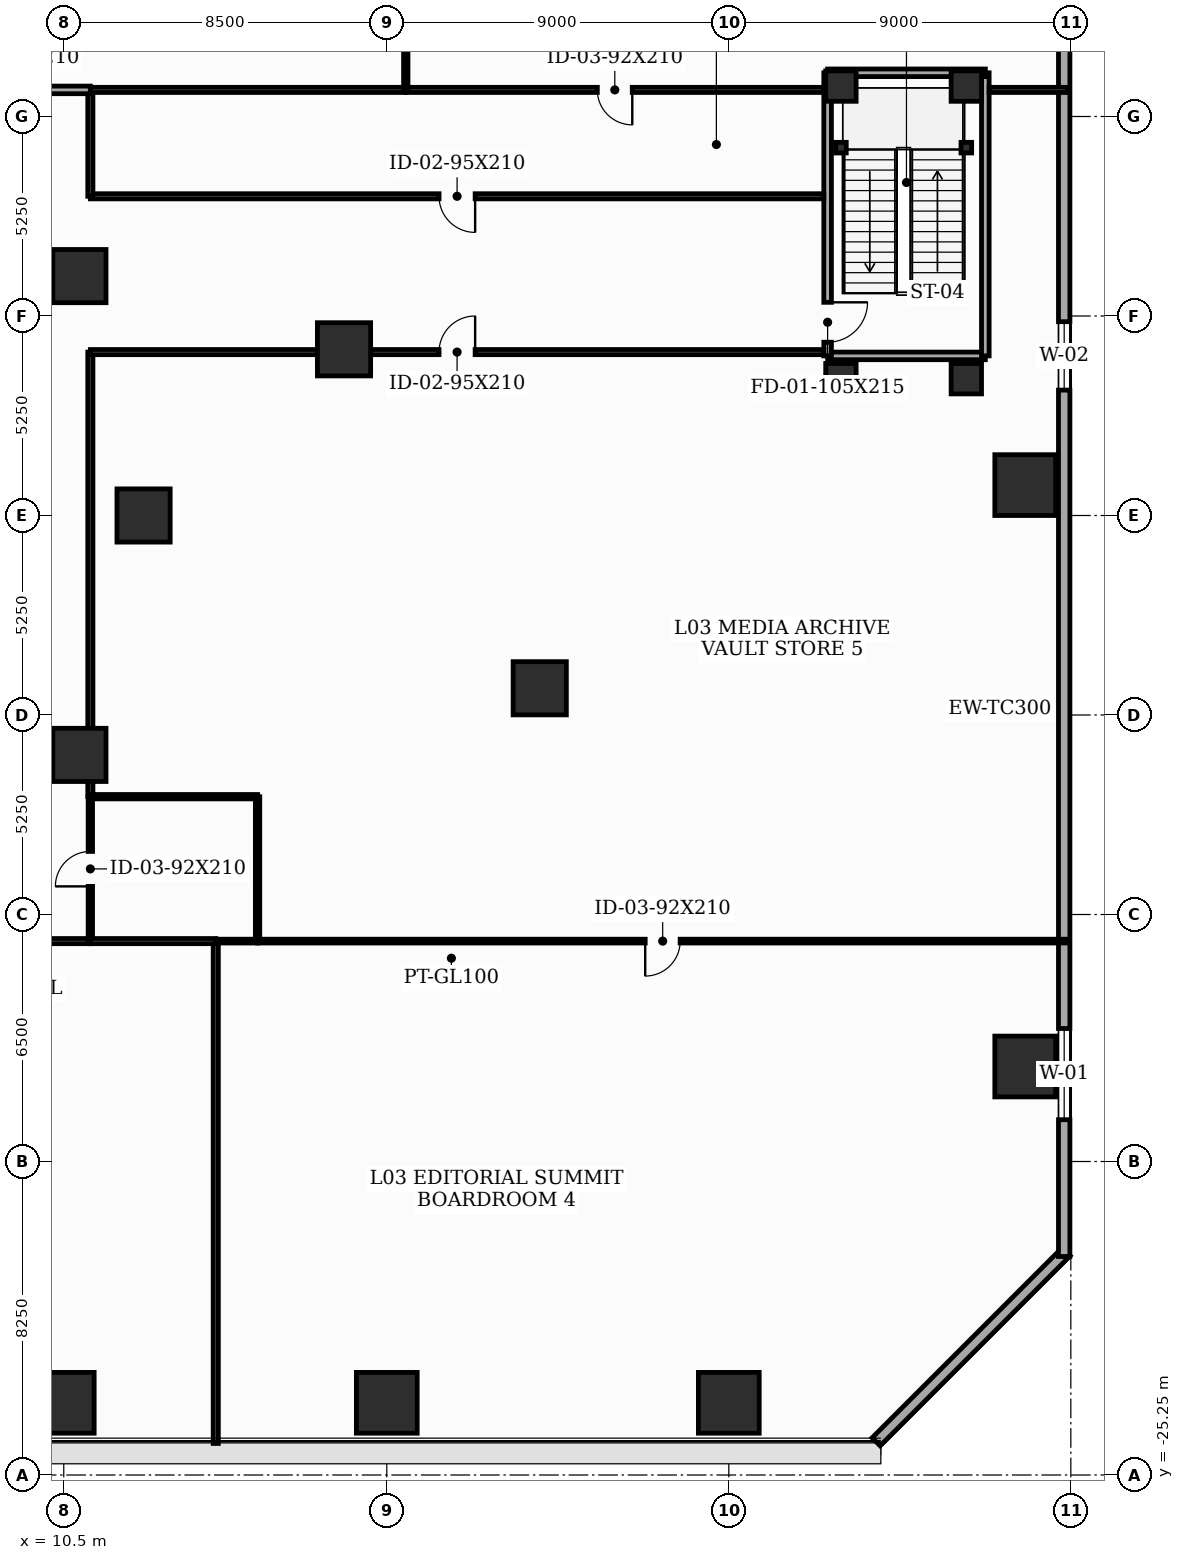
"""IFC4 building model, lengths in metres.
Left out: names, types, materials, properties, quantities, classifications, styles, units other than length and angle.
Written with IfcOpenShell. Run it as: python <this file> out.ifc"""

import sys

from ifc_helpers import new_model, si_unit, direction, frame, frame_2d, origin, origin_2d, place, context, subcontext, project, spatial, rectangle, i_section, extrude, element, fill, save


model = new_model("IFC4")
c1 = context("Model", 3, precision=1e-05, world=origin(), true_north=direction((0.0, 1.0)))
c2 = subcontext(c1, "Body", "Model", "MODEL_VIEW")
j1 = project(units=[si_unit("LENGTHUNIT", "METRE"), si_unit("PLANEANGLEUNIT", "RADIAN")], contexts=[c1])
p1 = place(None, origin())
s1 = spatial("IfcSite", under=j1, at=p1, CompositionType="ELEMENT")
p2 = place(p1, origin())
s2 = spatial("IfcBuilding", under=s1, at=p2, CompositionType="ELEMENT")
p3 = place(p2, frame((0.0, 0.0, 15.6)))
s3 = spatial("IfcBuildingStorey", under=s2, at=p3, CompositionType="ELEMENT", Elevation=15.6)
for number, where, z_axis, x_axis in (
    (1, (12.6, 0.0, 0.0), (0.0, 0.0, 1.0), (1.0, 0.0, 0.0)),
    (2, (10.912, 6.3, 0.0), (0.0, 0.0, 1.0), (1.0, 0.0, 0.0)),
    (3, (10.912, -6.3, 0.0), (0.0, 0.0, 1.0), (1.0, 0.0, 0.0)),
):
    element("IfcColumn", number, at=place(p3, frame(where, z_axis=z_axis, x_axis=x_axis)), inside=s3, PredefinedType="COLUMN", context=c2, shape_type="SweptSolid", body=[
        extrude(rectangle(XDim=1.4, YDim=1.4, at=origin_2d()), origin(), (0.0, 0.0, 1.0), 5.2),
    ])
for number, where, z_axis, x_axis in (
    (4, (10.5, -23.35, 0.0), (0.0, 0.0, 1.0), (1.0, 0.0, 0.0)),
    (5, (19.0, -23.35, 0.0), (0.0, 0.0, 1.0), (1.0, 0.0, 0.0)),
    (6, (28.0, -23.35, 0.0), (0.0, 0.0, 1.0), (1.0, 0.0, 0.0)),
    (7, (35.8, -14.5, 0.0), (0.0, 0.0, 1.0), (1.0, 0.0, 0.0)),
    (8, (35.8, 0.8, 0.0), (0.0, 0.0, 1.0), (1.0, 0.0, 0.0)),
):
    element("IfcColumn", number, at=place(p3, frame(where, z_axis=z_axis, x_axis=x_axis)), inside=s3, PredefinedType="COLUMN", context=c2, shape_type="SweptSolid", body=[
        extrude(rectangle(XDim=1.6, YDim=1.6, at=origin_2d()), origin(), (0.0, 0.0, 1.0), 5.2),
    ])
for number, where, z_axis, x_axis in (
    (9, (23.025, -4.547, 0.0), (0.0, 0.0, 1.0), (1.0, 0.0, 0.0)),
    (10, (17.875, 4.373, 0.0), (0.0, 0.0, 1.0), (1.0, 0.0, 0.0)),
):
    element("IfcColumn", number, at=place(p3, frame(where, z_axis=z_axis, x_axis=x_axis)), inside=s3, PredefinedType="COLUMN", context=c2, shape_type="SweptSolid", body=[
        extrude(rectangle(XDim=1.4, YDim=1.4, at=origin_2d()), origin(), (0.0, 0.0, 1.0), 5.2),
    ])
for number, where, z_axis, x_axis in (
    (11, (30.95, 3.6, 0.0), (0.0, 0.0, 1.0), (1.0, 0.0, 0.0)),
    (12, (34.25, 3.6, 0.0), (0.0, 0.0, 1.0), (1.0, 0.0, 0.0)),
    (13, (34.25, 11.3, 0.0), (0.0, 0.0, 1.0), (1.0, 0.0, 0.0)),
    (14, (30.95, 11.3, 0.0), (0.0, 0.0, 1.0), (1.0, 0.0, 0.0)),
):
    element("IfcColumn", number, at=place(p3, frame(where, z_axis=z_axis, x_axis=x_axis)), inside=s3, PredefinedType="COLUMN", context=c2, shape_type="SweptSolid", body=[
        extrude(rectangle(XDim=0.8, YDim=0.8, at=origin_2d()), origin(), (0.0, 0.0, 1.0), 5.2),
    ])
for number, where, z_axis, x_axis in (
    (15, (30.95, 9.68, 0.0), (0.0, 0.0, 1.0), (1.0, 0.0, 0.0)),
    (16, (34.25, 9.68, 0.0), (0.0, 0.0, 1.0), (1.0, 0.0, 0.0)),
):
    element("IfcColumn", number, at=place(p3, frame(where, z_axis=z_axis, x_axis=x_axis)), inside=s3, PredefinedType="PILASTER", context=c2, shape_type="SweptSolid", body=[
        extrude(i_section(OverallWidth=0.28, OverallDepth=0.28, WebThickness=0.01, FlangeThickness=0.018, at=origin_2d()), origin(), (0.0, 0.0, 1.0), 5.2),
    ])
p4 = place(p3, frame((31.876, -24.376, 0.0), z_axis=(0.0, 0.0, 1.0), x_axis=(0.707106781187, 0.707106781187, 0.0)))
e17 = element("IfcWall", 17, at=p4, inside=s3, PredefinedType="SOLIDWALL", context=c2, shape_type="SweptSolid", body=[
    extrude(rectangle(XDim=7.071, YDim=0.3, at=frame_2d((3.536, 0.0))), origin(), (0.0, 0.0, 1.0), 4.95),
])
p5 = place(p3, frame((36.825, -19.5, 0.0), z_axis=(0.0, 0.0, 1.0), x_axis=(0.0, 1.0, 0.0)))
e18 = element("IfcWall", 18, at=p5, inside=s3, PredefinedType="SOLIDWALL", context=c2, shape_type="SweptSolid", body=[
    extrude(rectangle(XDim=48.0, YDim=0.3, at=frame_2d((24.0, 0.0))), origin(), (0.0, 0.0, 1.0), 4.95),
])
p6 = place(p5, frame((3.6, 0.0, 0.9)))
e19 = element("IfcOpeningElement", 19, at=p6, cuts=e18, PredefinedType="OPENING", context=c2, shape_type="SweptSolid", body=[
    extrude(rectangle(XDim=2.4, YDim=1.35, at=frame_2d((1.2, 0.675))), frame((0.0, 0.16, 0.0), z_axis=(0.0, -1.0, 0.0), x_axis=(1.0, 0.0, 0.0)), (0.0, 0.0, 1.0), 0.32),
])
p7 = place(p5, frame((22.8, 0.0, 0.9)))
e20 = element("IfcOpeningElement", 20, at=p7, cuts=e18, PredefinedType="OPENING", context=c2, shape_type="SweptSolid", body=[
    extrude(rectangle(XDim=1.8, YDim=1.35, at=frame_2d((0.9, 0.675))), frame((0.0, 0.16, 0.0), z_axis=(0.0, -1.0, 0.0), x_axis=(1.0, 0.0, 0.0)), (0.0, 0.0, 1.0), 0.32),
])
p8 = place(p5, frame((33.8, 0.0, 0.9)))
e21 = element("IfcOpeningElement", 21, at=p8, cuts=e18, PredefinedType="OPENING", context=c2, shape_type="SweptSolid", body=[
    extrude(rectangle(XDim=2.4, YDim=1.35, at=frame_2d((1.2, 0.675))), frame((0.0, 0.16, 0.0), z_axis=(0.0, -1.0, 0.0), x_axis=(1.0, 0.0, 0.0)), (0.0, 0.0, 1.0), 0.32),
])
p9 = place(p3, frame((30.6, 4.2, 0.0), z_axis=(0.0, 0.0, 1.0), x_axis=(1.0, 0.0, 0.0)))
e22 = element("IfcWall", 22, at=p9, inside=s3, PredefinedType="SOLIDWALL", context=c2, shape_type="SweptSolid", body=[
    extrude(rectangle(XDim=4.15, YDim=0.2, at=frame_2d((2.075, 0.0))), origin(), (0.0, 0.0, 1.0), 4.95),
])
p10 = place(p3, frame((34.75, 4.2, 0.0), z_axis=(0.0, 0.0, 1.0), x_axis=(0.0, 1.0, 0.0)))
e23 = element("IfcWall", 23, at=p10, inside=s3, PredefinedType="SOLIDWALL", context=c2, shape_type="SweptSolid", body=[
    extrude(rectangle(XDim=7.45, YDim=0.2, at=frame_2d((3.725, 0.0))), origin(), (0.0, 0.0, 1.0), 4.95),
])
p11 = place(p3, frame((34.75, 11.65, 0.0), z_axis=(0.0, 0.0, 1.0), x_axis=(-1.0, 0.0, 0.0)))
e24 = element("IfcWall", 24, at=p11, inside=s3, PredefinedType="SOLIDWALL", context=c2, shape_type="SweptSolid", body=[
    extrude(rectangle(XDim=4.15, YDim=0.2, at=frame_2d((2.075, 0.0))), origin(), (0.0, 0.0, 1.0), 4.95),
])
p12 = place(p3, frame((30.6, 11.65, 0.0), z_axis=(0.0, 0.0, 1.0), x_axis=(0.0, -1.0, 0.0)))
e25 = element("IfcWall", 25, at=p12, inside=s3, PredefinedType="SOLIDWALL", context=c2, shape_type="SweptSolid", body=[
    extrude(rectangle(XDim=7.45, YDim=0.2, at=frame_2d((3.725, 0.0))), origin(), (0.0, 0.0, 1.0), 4.95),
])
p13 = place(p12, frame((6.04, 0.0, 0.0)))
e26 = element("IfcOpeningElement", 26, at=p13, cuts=e25, PredefinedType="OPENING", context=c2, shape_type="SweptSolid", body=[
    extrude(rectangle(XDim=1.05, YDim=2.15, at=frame_2d((0.525, 1.075))), frame((0.0, 0.11, 0.0), z_axis=(0.0, -1.0, 0.0), x_axis=(1.0, 0.0, 0.0)), (0.0, 0.0, 1.0), 0.22),
])
p14 = place(p3, frame((-7.5, -11.2, 0.0), z_axis=(0.0, 0.0, 1.0), x_axis=(1.0, 0.0, 0.0)))
e27 = element("IfcWall", 27, at=p14, inside=s3, PredefinedType="PARTITIONING", context=c2, shape_type="SweptSolid", body=[
    extrude(rectangle(XDim=18.7, YDim=0.135, at=frame_2d((9.35, 0.0))), origin(), (0.0, 0.0, 1.0), 3.435),
])
p15 = place(p14, frame((4.761, 0.0, 0.0)))
e28 = element("IfcOpeningElement", 28, at=p15, cuts=e27, PredefinedType="OPENING", context=c2, shape_type="SweptSolid", body=[
    extrude(rectangle(XDim=0.95, YDim=2.1, at=frame_2d((0.475, 1.05))), frame((0.0, 0.077, 0.0), z_axis=(0.0, -1.0, 0.0), x_axis=(1.0, 0.0, 0.0)), (0.0, 0.0, 1.0), 0.155),
])
p16 = place(p3, frame((11.2, -11.2, 0.0), z_axis=(0.0, 0.0, 1.0), x_axis=(0.0, 1.0, 0.0)))
e29 = element("IfcWall", 29, at=p16, inside=s3, PredefinedType="PARTITIONING", context=c2, shape_type="SweptSolid", body=[
    extrude(rectangle(XDim=3.8, YDim=0.115, at=frame_2d((1.9, 0.0))), origin(), (0.0, 0.0, 1.0), 4.95),
])
p17 = place(p16, frame((1.44, 0.0, 0.0)))
e30 = element("IfcOpeningElement", 30, at=p17, cuts=e29, PredefinedType="OPENING", context=c2, shape_type="SweptSolid", body=[
    extrude(rectangle(XDim=0.92, YDim=2.1, at=frame_2d((0.46, 1.05))), frame((0.0, 0.067, 0.0), z_axis=(0.0, -1.0, 0.0), x_axis=(1.0, 0.0, 0.0)), (0.0, 0.0, 1.0), 0.135),
])
p18 = place(p3, frame((11.2, -7.4, 0.0), z_axis=(0.0, 0.0, 1.0), x_axis=(0.0, 1.0, 0.0)))
e31 = element("IfcWall", 31, at=p18, inside=s3, PredefinedType="PARTITIONING", context=c2, shape_type="SweptSolid", body=[
    extrude(rectangle(XDim=11.7, YDim=0.135, at=frame_2d((5.85, 0.0))), origin(), (0.0, 0.0, 1.0), 4.235),
])
p19 = place(p3, frame((11.2, 4.3, 0.0), z_axis=(0.0, 0.0, 1.0), x_axis=(1.0, 0.0, 0.0)))
e32 = element("IfcWall", 32, at=p19, inside=s3, PredefinedType="PARTITIONING", context=c2, shape_type="SweptSolid", body=[
    extrude(rectangle(XDim=19.3, YDim=0.135, at=frame_2d((9.65, 0.0))), origin(), (0.0, 0.0, 1.0), 3.435),
])
p20 = place(p19, frame((9.175, 0.0, 0.0)))
e33 = element("IfcOpeningElement", 33, at=p20, cuts=e32, PredefinedType="OPENING", context=c2, shape_type="SweptSolid", body=[
    extrude(rectangle(XDim=0.95, YDim=2.1, at=frame_2d((0.475, 1.05))), frame((0.0, 0.077, 0.0), z_axis=(0.0, -1.0, 0.0), x_axis=(1.0, 0.0, 0.0)), (0.0, 0.0, 1.0), 0.155),
])
p21 = place(p3, frame((30.5, 8.4, 0.0), z_axis=(0.0, 0.0, 1.0), x_axis=(-1.0, 0.0, 0.0)))
e34 = element("IfcWall", 34, at=p21, inside=s3, PredefinedType="PARTITIONING", context=c2, shape_type="SweptSolid", body=[
    extrude(rectangle(XDim=19.3, YDim=0.135, at=frame_2d((9.65, 0.0))), origin(), (0.0, 0.0, 1.0), 4.235),
])
p22 = place(p21, frame((9.175, 0.0, 0.0)))
e35 = element("IfcOpeningElement", 35, at=p22, cuts=e34, PredefinedType="OPENING", context=c2, shape_type="SweptSolid", body=[
    extrude(rectangle(XDim=0.95, YDim=2.1, at=frame_2d((0.475, 1.05))), frame((0.0, 0.077, 0.0), z_axis=(0.0, -1.0, 0.0), x_axis=(1.0, 0.0, 0.0)), (0.0, 0.0, 1.0), 0.155),
])
p23 = place(p3, frame((11.2, 8.4, 0.0), z_axis=(0.0, 0.0, 1.0), x_axis=(0.0, 1.0, 0.0)))
e36 = element("IfcWall", 36, at=p23, inside=s3, PredefinedType="PARTITIONING", context=c2, shape_type="SweptSolid", body=[
    extrude(rectangle(XDim=2.8, YDim=0.135, at=frame_2d((1.4, 0.0))), origin(), (0.0, 0.0, 1.0), 4.95),
])
p24 = place(p3, frame((11.2, 11.2, 0.0), z_axis=(0.0, 0.0, 1.0), x_axis=(-1.0, 0.0, 0.0)))
e37 = element("IfcWall", 37, at=p24, inside=s3, PredefinedType="SOLIDWALL", context=c2, shape_type="SweptSolid", body=[
    extrude(rectangle(XDim=7.7, YDim=0.2, at=frame_2d((3.85, 0.0))), origin(), (0.0, 0.0, 1.0), 3.435),
])
p25 = place(p24, frame((1.681, 0.0, 0.0)))
e38 = element("IfcOpeningElement", 38, at=p25, cuts=e37, PredefinedType="OPENING", context=c2, shape_type="SweptSolid", body=[
    extrude(rectangle(XDim=0.95, YDim=2.1, at=frame_2d((0.475, 1.05))), frame((0.0, 0.11, 0.0), z_axis=(0.0, -1.0, 0.0), x_axis=(1.0, 0.0, 0.0)), (0.0, 0.0, 1.0), 0.22),
])
p26 = place(p3, frame((14.5, -24.42, 0.0), z_axis=(0.0, 0.0, 1.0), x_axis=(0.0, 1.0, 0.0)))
e39 = element("IfcWall", 39, at=p26, inside=s3, PredefinedType="PARTITIONING", context=c2, shape_type="SweptSolid", body=[
    extrude(rectangle(XDim=13.22, YDim=0.135, at=frame_2d((6.61, 0.0))), origin(), (0.0, 0.0, 1.0), 3.435),
])
p27 = place(p3, frame((14.5, -11.2, 0.0), z_axis=(0.0, 0.0, 1.0), x_axis=(-1.0, 0.0, 0.0)))
e40 = element("IfcWall", 40, at=p27, inside=s3, PredefinedType="PARTITIONING", context=c2, shape_type="SweptSolid", body=[
    extrude(rectangle(XDim=3.3, YDim=0.135, at=frame_2d((1.65, 0.0))), origin(), (0.0, 0.0, 1.0), 4.95),
])
p28 = place(p3, frame((15.6, -11.2, 0.0), z_axis=(0.0, 0.0, 1.0), x_axis=(-1.0, 0.0, 0.0)))
e41 = element("IfcWall", 41, at=p28, inside=s3, PredefinedType="MOVABLE", context=c2, shape_type="SweptSolid", body=[
    extrude(rectangle(XDim=1.1, YDim=0.1, at=frame_2d((0.55, 0.0))), origin(), (0.0, 0.0, 1.0), 4.95),
])
p29 = place(p3, frame((36.92, -11.2, 0.0), z_axis=(0.0, 0.0, 1.0), x_axis=(-1.0, 0.0, 0.0)))
e42 = element("IfcWall", 42, at=p29, inside=s3, PredefinedType="MOVABLE", context=c2, shape_type="SweptSolid", body=[
    extrude(rectangle(XDim=21.32, YDim=0.1, at=frame_2d((10.66, 0.0))), origin(), (0.0, 0.0, 1.0), 3.435),
])
p30 = place(p29, frame((10.2, 0.0, 0.0)))
e43 = element("IfcOpeningElement", 43, at=p30, cuts=e42, PredefinedType="OPENING", context=c2, shape_type="SweptSolid", body=[
    extrude(rectangle(XDim=0.92, YDim=2.1, at=frame_2d((0.46, 1.05))), frame((0.0, 0.06, 0.0), z_axis=(0.0, -1.0, 0.0), x_axis=(1.0, 0.0, 0.0)), (0.0, 0.0, 1.0), 0.12),
])
p31 = place(p3, frame((15.6, -11.2, 0.0), z_axis=(0.0, 0.0, 1.0), x_axis=(0.0, 1.0, 0.0)))
e44 = element("IfcWall", 44, at=p31, inside=s3, PredefinedType="PARTITIONING", context=c2, shape_type="SweptSolid", body=[
    extrude(rectangle(XDim=3.8, YDim=0.115, at=frame_2d((1.9, 0.0))), origin(), (0.0, 0.0, 1.0), 4.95),
])
p32 = place(p3, frame((15.6, -7.4, 0.0), z_axis=(0.0, 0.0, 1.0), x_axis=(-1.0, 0.0, 0.0)))
e45 = element("IfcWall", 45, at=p32, inside=s3, PredefinedType="PARTITIONING", context=c2, shape_type="SweptSolid", body=[
    extrude(rectangle(XDim=4.4, YDim=0.115, at=frame_2d((2.2, 0.0))), origin(), (0.0, 0.0, 1.0), 4.95),
])
p33 = place(p3, frame((36.92, 11.2, 0.0), z_axis=(0.0, 0.0, 1.0), x_axis=(-1.0, 0.0, 0.0)))
e46 = element("IfcWall", 46, at=p33, inside=s3, PredefinedType="PARTITIONING", context=c2, shape_type="SweptSolid", body=[
    extrude(rectangle(XDim=2.07, YDim=0.135, at=frame_2d((1.035, 0.0))), origin(), (0.0, 0.0, 1.0), 4.235),
])
p34 = place(p3, frame((30.5, 11.2, 0.0), z_axis=(0.0, 0.0, 1.0), x_axis=(-1.0, 0.0, 0.0)))
e47 = element("IfcWall", 47, at=p34, inside=s3, PredefinedType="PARTITIONING", context=c2, shape_type="SweptSolid", body=[
    extrude(rectangle(XDim=11.0, YDim=0.135, at=frame_2d((5.5, 0.0))), origin(), (0.0, 0.0, 1.0), 4.95),
])
p35 = place(p34, frame((5.04, 0.0, 0.0)))
e48 = element("IfcOpeningElement", 48, at=p35, cuts=e47, PredefinedType="OPENING", context=c2, shape_type="SweptSolid", body=[
    extrude(rectangle(XDim=0.92, YDim=2.1, at=frame_2d((0.46, 1.05))), frame((0.0, 0.077, 0.0), z_axis=(0.0, -1.0, 0.0), x_axis=(1.0, 0.0, 0.0)), (0.0, 0.0, 1.0), 0.155),
])
p36 = place(p3, frame((19.5, 11.2, 0.0), z_axis=(0.0, 0.0, 1.0), x_axis=(-1.0, 0.0, 0.0)))
e49 = element("IfcWall", 49, at=p36, inside=s3, PredefinedType="PARTITIONING", context=c2, shape_type="SweptSolid", body=[
    extrude(rectangle(XDim=8.3, YDim=0.135, at=frame_2d((4.15, 0.0))), origin(), (0.0, 0.0, 1.0), 4.235),
])
p37 = place(p3, frame((19.5, 33.42, 0.0), z_axis=(0.0, 0.0, 1.0), x_axis=(0.0, -1.0, 0.0)))
e50 = element("IfcWall", 50, at=p37, inside=s3, PredefinedType="PARTITIONING", context=c2, shape_type="SweptSolid", body=[
    extrude(rectangle(XDim=22.22, YDim=0.115, at=frame_2d((11.11, 0.0))), origin(), (0.0, 0.0, 1.0), 3.435),
])
p38 = place(p6, origin())
e51 = element("IfcWindow", 51, at=p38, inside=s3, PartitioningType="SINGLE_PANEL", PredefinedType="WINDOW", context=c2, shape_type="SweptSolid", body=[
    extrude(rectangle(XDim=2.4, YDim=1.35, at=frame_2d((1.2, 0.675))), frame((0.0, 0.03, 0.0), z_axis=(0.0, -1.0, 0.0), x_axis=(1.0, 0.0, 0.0)), (0.0, 0.0, 1.0), 0.06),
])
fill(e19, e51)
p39 = place(p7, origin())
e52 = element("IfcWindow", 52, at=p39, inside=s3, PartitioningType="SINGLE_PANEL", PredefinedType="WINDOW", context=c2, shape_type="SweptSolid", body=[
    extrude(rectangle(XDim=1.8, YDim=1.35, at=frame_2d((0.9, 0.675))), frame((0.0, 0.03, 0.0), z_axis=(0.0, -1.0, 0.0), x_axis=(1.0, 0.0, 0.0)), (0.0, 0.0, 1.0), 0.06),
])
fill(e20, e52)
p40 = place(p13, origin())
e53 = element("IfcDoor", 53, at=p40, inside=s3, OperationType="SINGLE_SWING_LEFT", PredefinedType="DOOR", context=c2, shape_type="SweptSolid", body=[
    extrude(rectangle(XDim=1.05, YDim=2.15, at=frame_2d((0.525, 1.075))), frame((0.0, 0.025, 0.0), z_axis=(0.0, -1.0, 0.0), x_axis=(1.0, 0.0, 0.0)), (0.0, 0.0, 1.0), 0.05),
])
fill(e26, e53)
p41 = place(p17, origin())
e54 = element("IfcDoor", 54, at=p41, inside=s3, OperationType="SINGLE_SWING_LEFT", PredefinedType="DOOR", context=c2, shape_type="SweptSolid", body=[
    extrude(rectangle(XDim=0.92, YDim=2.1, at=frame_2d((0.46, 1.05))), frame((0.0, 0.025, 0.0), z_axis=(0.0, -1.0, 0.0), x_axis=(1.0, 0.0, 0.0)), (0.0, 0.0, 1.0), 0.05),
])
fill(e30, e54)
p42 = place(p20, origin())
e55 = element("IfcDoor", 55, at=p42, inside=s3, OperationType="SINGLE_SWING_RIGHT", PredefinedType="DOOR", context=c2, shape_type="SweptSolid", body=[
    extrude(rectangle(XDim=0.95, YDim=2.1, at=frame_2d((0.475, 1.05))), frame((0.0, 0.025, 0.0), z_axis=(0.0, -1.0, 0.0), x_axis=(1.0, 0.0, 0.0)), (0.0, 0.0, 1.0), 0.05),
])
fill(e33, e55)
p43 = place(p22, origin())
e56 = element("IfcDoor", 56, at=p43, inside=s3, OperationType="SINGLE_SWING_LEFT", PredefinedType="DOOR", context=c2, shape_type="SweptSolid", body=[
    extrude(rectangle(XDim=0.95, YDim=2.1, at=frame_2d((0.475, 1.05))), frame((0.0, 0.025, 0.0), z_axis=(0.0, -1.0, 0.0), x_axis=(1.0, 0.0, 0.0)), (0.0, 0.0, 1.0), 0.05),
])
fill(e35, e56)
p44 = place(p30, origin())
e57 = element("IfcDoor", 57, at=p44, inside=s3, OperationType="SINGLE_SWING_RIGHT", PredefinedType="DOOR", context=c2, shape_type="SweptSolid", body=[
    extrude(rectangle(XDim=0.92, YDim=2.1, at=frame_2d((0.46, 1.05))), frame((0.0, 0.025, 0.0), z_axis=(0.0, -1.0, 0.0), x_axis=(1.0, 0.0, 0.0)), (0.0, 0.0, 1.0), 0.05),
])
fill(e43, e57)
p45 = place(p35, origin())
e58 = element("IfcDoor", 58, at=p45, inside=s3, OperationType="SINGLE_SWING_LEFT", PredefinedType="DOOR", context=c2, shape_type="SweptSolid", body=[
    extrude(rectangle(XDim=0.92, YDim=2.1, at=frame_2d((0.46, 1.05))), frame((0.0, 0.025, 0.0), z_axis=(0.0, -1.0, 0.0), x_axis=(1.0, 0.0, 0.0)), (0.0, 0.0, 1.0), 0.05),
])
fill(e48, e58)
save(model, sys.argv[1])
